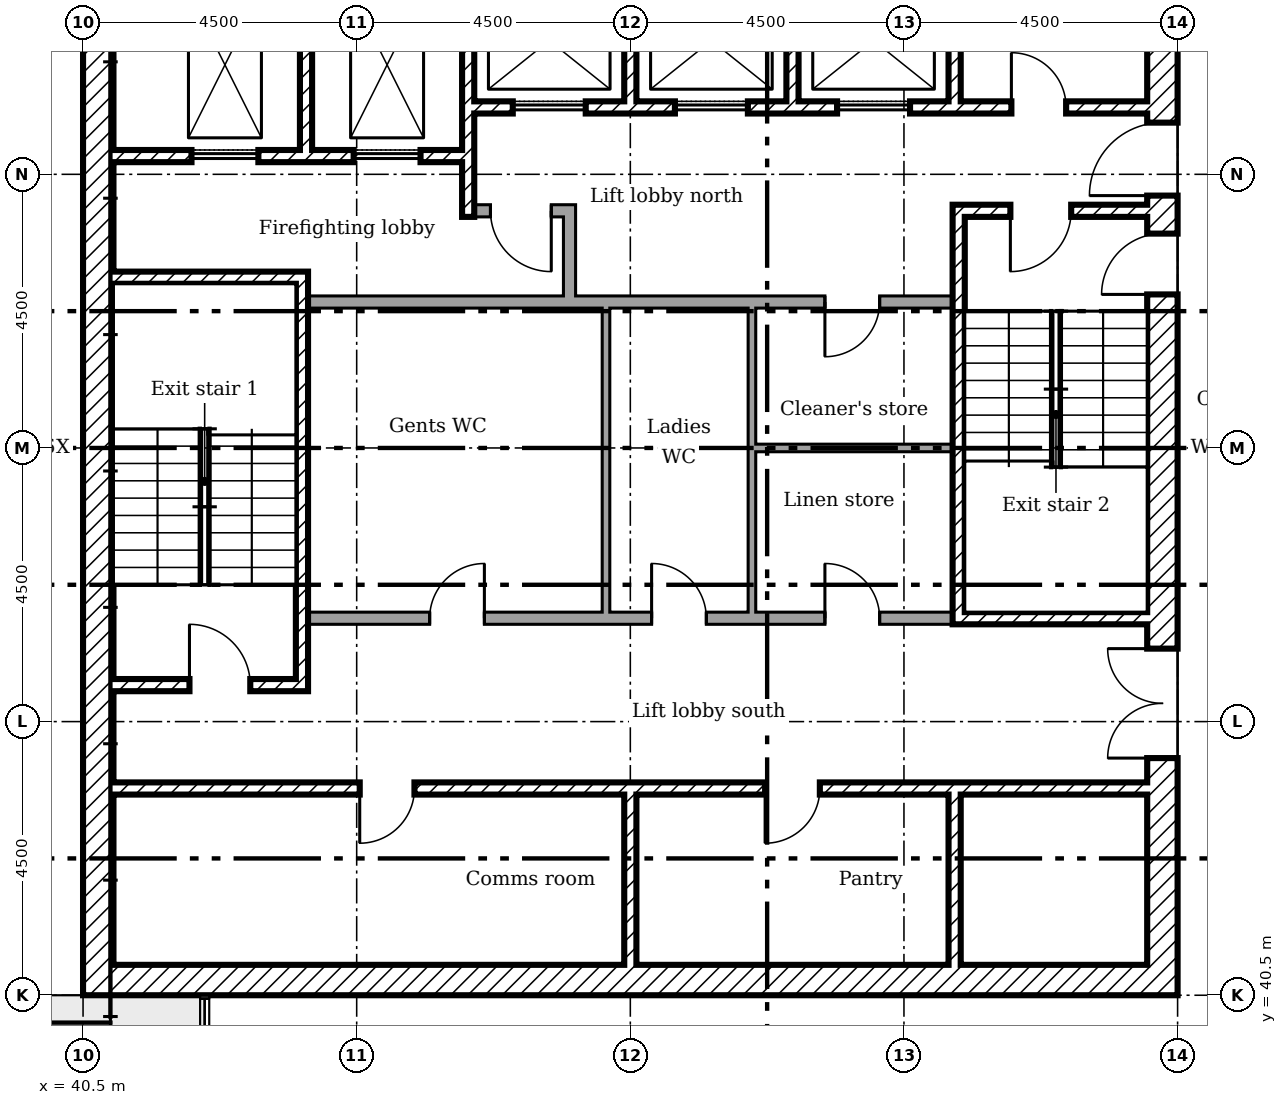
"""IFC4 building model, lengths in metres.
Left out: names, types, materials, properties, quantities, classifications, styles, units other than length and angle.
Written with IfcOpenShell. Run it as: python <this file> out.ifc"""

import sys

from ifc_helpers import new_model, si_unit, direction, frame, frame_2d, origin, place, context, subcontext, project, spatial, rectangle, extrude, element, fill, save


model = new_model("IFC4")
c1 = context("Model", 3, precision=1e-05, world=origin(), true_north=direction((0.0, 1.0)))
c2 = subcontext(c1, "Body", "Model", "MODEL_VIEW")
j1 = project(units=[si_unit("LENGTHUNIT", "METRE"), si_unit("PLANEANGLEUNIT", "RADIAN")], contexts=[c1])
p1 = place(None, origin())
s1 = spatial("IfcSite", under=j1, at=p1, CompositionType="ELEMENT")
p2 = place(p1, origin())
s2 = spatial("IfcBuilding", under=s1, at=p2, CompositionType="ELEMENT")
p3 = place(p2, frame((0.0, 0.0, 195.6)))
s3 = spatial("IfcBuildingStorey", under=s2, at=p3, CompositionType="ELEMENT", Elevation=195.6)
p4 = place(p3, frame((58.25, 40.5, 0.0), z_axis=(0.0, 0.0, 1.0), x_axis=(0.0, 1.0, 0.0)))
e1 = element("IfcWall", 1, at=p4, inside=s3, PredefinedType="SHEAR", context=c2, shape_type="SweptSolid", body=[
    extrude(rectangle(XDim=18.0, YDim=0.5, at=frame_2d((9.0, 0.0))), origin(), (0.0, 0.0, 1.0), 3.35),
])
p5 = place(p4, frame((13.15, 0.0, 0.0)))
e2 = element("IfcOpeningElement", 2, at=p5, cuts=e1, PredefinedType="OPENING", context=c2, shape_type="SweptSolid", body=[
    extrude(rectangle(XDim=1.2, YDim=2.1, at=frame_2d((0.6, 1.05))), frame((0.0, 0.26, 0.0), z_axis=(0.0, -1.0, 0.0), x_axis=(1.0, 0.0, 0.0)), (0.0, 0.0, 1.0), 0.52),
])
p6 = place(p4, frame((3.9, 0.0, 0.0)))
e3 = element("IfcOpeningElement", 3, at=p6, cuts=e1, PredefinedType="OPENING", context=c2, shape_type="SweptSolid", body=[
    extrude(rectangle(XDim=1.8, YDim=2.1, at=frame_2d((0.9, 1.05))), frame((0.0, 0.26, 0.0), z_axis=(0.0, -1.0, 0.0), x_axis=(1.0, 0.0, 0.0)), (0.0, 0.0, 1.0), 0.52),
])
p7 = place(p4, frame((11.525, 0.0, 0.0)))
e4 = element("IfcOpeningElement", 4, at=p7, cuts=e1, PredefinedType="OPENING", context=c2, shape_type="SweptSolid", body=[
    extrude(rectangle(XDim=1.0, YDim=2.1, at=frame_2d((0.5, 1.05))), frame((0.0, 0.26, 0.0), z_axis=(0.0, -1.0, 0.0), x_axis=(1.0, 0.0, 0.0)), (0.0, 0.0, 1.0), 0.52),
])
p8 = place(p3, frame((40.5, 40.75, 0.0)))
e5 = element("IfcWall", 5, at=p8, inside=s3, PredefinedType="SHEAR", context=c2, shape_type="SweptSolid", body=[
    extrude(rectangle(XDim=17.5, YDim=0.5, at=frame_2d((8.75, 0.0))), origin(), (0.0, 0.0, 1.0), 3.35),
])
p9 = place(p3, frame((40.75, 41.0, 0.0), z_axis=(0.0, 0.0, 1.0), x_axis=(0.0, 1.0, 0.0)))
e6 = element("IfcWall", 6, at=p9, inside=s3, PredefinedType="SHEAR", context=c2, shape_type="SweptSolid", body=[
    extrude(rectangle(XDim=17.0, YDim=0.5, at=frame_2d((8.5, 0.0))), origin(), (0.0, 0.0, 1.0), 3.35),
])
p10 = place(p3, frame((44.167, 58.0, 0.0), z_axis=(0.0, 0.0, 1.0), x_axis=(0.0, -1.0, 0.0)))
e7 = element("IfcWall", 7, at=p10, inside=s3, PredefinedType="SHEAR", context=c2, shape_type="SweptSolid", body=[
    extrude(rectangle(XDim=3.6, YDim=0.2, at=frame_2d((1.8, 0.0))), origin(), (0.0, 0.0, 1.0), 3.35),
])
p11 = place(p3, frame((46.833, 58.0, 0.0), z_axis=(0.0, 0.0, 1.0), x_axis=(0.0, -1.0, 0.0)))
e8 = element("IfcWall", 8, at=p11, inside=s3, PredefinedType="SHEAR", context=c2, shape_type="SweptSolid", body=[
    extrude(rectangle(XDim=4.7, YDim=0.2, at=frame_2d((2.35, 0.0))), origin(), (0.0, 0.0, 1.0), 3.35),
])
for number, where, z_axis, x_axis in (
    (9, (49.5, 58.0, 0.0), (0.0, 0.0, 1.0), (0.0, -1.0, 0.0)),
    (10, (52.167, 58.0, 0.0), (0.0, 0.0, 1.0), (0.0, -1.0, 0.0)),
    (11, (54.833, 58.0, 0.0), (0.0, 0.0, 1.0), (0.0, -1.0, 0.0)),
    (12, (49.5, 41.0, 0.0), (0.0, 0.0, 1.0), (0.0, 1.0, 0.0)),
    (13, (54.833, 41.0, 0.0), (0.0, 0.0, 1.0), (0.0, 1.0, 0.0)),
):
    element("IfcWall", number, at=place(p3, frame(where, z_axis=z_axis, x_axis=x_axis)), inside=s3, PredefinedType="SHEAR", context=c2, shape_type="SweptSolid", body=[
        extrude(rectangle(XDim=2.8, YDim=0.2, at=frame_2d((1.4, 0.0))), origin(), (0.0, 0.0, 1.0), 3.35),
    ])
p12 = place(p3, frame((48.5, 51.9, 0.0), z_axis=(0.0, 0.0, 1.0), x_axis=(0.0, 1.0, 0.0)))
e14 = element("IfcWall", 14, at=p12, inside=s3, PredefinedType="PARTITIONING", context=c2, shape_type="SweptSolid", body=[
    extrude(rectangle(XDim=1.6, YDim=0.2, at=frame_2d((0.8, 0.0))), origin(), (0.0, 0.0, 1.0), 3.35),
])
p13 = place(p3, frame((46.933, 53.4, 0.0)))
e15 = element("IfcWall", 15, at=p13, inside=s3, PredefinedType="PARTITIONING", context=c2, shape_type="SweptSolid", body=[
    extrude(rectangle(XDim=1.467, YDim=0.2, at=frame_2d((0.733, 0.0))), origin(), (0.0, 0.0, 1.0), 3.35),
])
p14 = place(p13, frame((0.267, 0.0, 0.0)))
e16 = element("IfcOpeningElement", 16, at=p14, cuts=e15, PredefinedType="OPENING", context=c2, shape_type="SweptSolid", body=[
    extrude(rectangle(XDim=1.0, YDim=2.1, at=frame_2d((0.5, 1.05))), frame((0.0, 0.11, 0.0), z_axis=(0.0, -1.0, 0.0), x_axis=(1.0, 0.0, 0.0)), (0.0, 0.0, 1.0), 0.22),
])
p15 = place(p3, frame((46.933, 55.1, 0.0)))
e17 = element("IfcWall", 17, at=p15, inside=s3, PredefinedType="SHEAR", context=c2, shape_type="SweptSolid", body=[
    extrude(rectangle(XDim=11.067, YDim=0.2, at=frame_2d((5.533, 0.0))), origin(), (0.0, 0.0, 1.0), 3.35),
])
p16 = place(p15, frame((8.833, 0.0, 0.0)))
e18 = element("IfcOpeningElement", 18, at=p16, cuts=e17, PredefinedType="OPENING", context=c2, shape_type="SweptSolid", body=[
    extrude(rectangle(XDim=0.9, YDim=2.1, at=frame_2d((0.45, 1.05))), frame((0.0, 0.11, 0.0), z_axis=(0.0, -1.0, 0.0), x_axis=(1.0, 0.0, 0.0)), (0.0, 0.0, 1.0), 0.22),
])
p17 = place(p15, frame((0.633, 0.0, 0.0)))
e19 = element("IfcOpeningElement", 19, at=p17, cuts=e17, PredefinedType="OPENING", context=c2, shape_type="SweptSolid", body=[
    extrude(rectangle(XDim=1.2, YDim=2.1, at=frame_2d((0.6, 1.05))), frame((0.0, 0.11, 0.0), z_axis=(0.0, -1.0, 0.0), x_axis=(1.0, 0.0, 0.0)), (0.0, 0.0, 1.0), 0.22),
])
p18 = place(p15, frame((3.3, 0.0, 0.0)))
e20 = element("IfcOpeningElement", 20, at=p18, cuts=e17, PredefinedType="OPENING", context=c2, shape_type="SweptSolid", body=[
    extrude(rectangle(XDim=1.2, YDim=2.1, at=frame_2d((0.6, 1.05))), frame((0.0, 0.11, 0.0), z_axis=(0.0, -1.0, 0.0), x_axis=(1.0, 0.0, 0.0)), (0.0, 0.0, 1.0), 0.22),
])
p19 = place(p15, frame((5.967, 0.0, 0.0)))
e21 = element("IfcOpeningElement", 21, at=p19, cuts=e17, PredefinedType="OPENING", context=c2, shape_type="SweptSolid", body=[
    extrude(rectangle(XDim=1.2, YDim=2.1, at=frame_2d((0.6, 1.05))), frame((0.0, 0.11, 0.0), z_axis=(0.0, -1.0, 0.0), x_axis=(1.0, 0.0, 0.0)), (0.0, 0.0, 1.0), 0.22),
])
p20 = place(p3, frame((41.0, 54.3, 0.0)))
e22 = element("IfcWall", 22, at=p20, inside=s3, PredefinedType="SHEAR", context=c2, shape_type="SweptSolid", body=[
    extrude(rectangle(XDim=5.733, YDim=0.2, at=frame_2d((2.867, 0.0))), origin(), (0.0, 0.0, 1.0), 3.35),
])
p21 = place(p20, frame((1.283, 0.0, 0.0)))
e23 = element("IfcOpeningElement", 23, at=p21, cuts=e22, PredefinedType="OPENING", context=c2, shape_type="SweptSolid", body=[
    extrude(rectangle(XDim=1.1, YDim=2.1, at=frame_2d((0.55, 1.05))), frame((0.0, 0.11, 0.0), z_axis=(0.0, -1.0, 0.0), x_axis=(1.0, 0.0, 0.0)), (0.0, 0.0, 1.0), 0.22),
])
p22 = place(p20, frame((3.95, 0.0, 0.0)))
e24 = element("IfcOpeningElement", 24, at=p22, cuts=e22, PredefinedType="OPENING", context=c2, shape_type="SweptSolid", body=[
    extrude(rectangle(XDim=1.1, YDim=2.1, at=frame_2d((0.55, 1.05))), frame((0.0, 0.11, 0.0), z_axis=(0.0, -1.0, 0.0), x_axis=(1.0, 0.0, 0.0)), (0.0, 0.0, 1.0), 0.22),
])
p23 = place(p3, frame((41.0, 43.9, 0.0)))
e25 = element("IfcWall", 25, at=p23, inside=s3, PredefinedType="SHEAR", context=c2, shape_type="SweptSolid", body=[
    extrude(rectangle(XDim=17.0, YDim=0.2, at=frame_2d((8.5, 0.0))), origin(), (0.0, 0.0, 1.0), 3.35),
])
p24 = place(p23, frame((4.05, 0.0, 0.0)))
e26 = element("IfcOpeningElement", 26, at=p24, cuts=e25, PredefinedType="OPENING", context=c2, shape_type="SweptSolid", body=[
    extrude(rectangle(XDim=0.9, YDim=2.1, at=frame_2d((0.45, 1.05))), frame((0.0, 0.11, 0.0), z_axis=(0.0, -1.0, 0.0), x_axis=(1.0, 0.0, 0.0)), (0.0, 0.0, 1.0), 0.22),
])
p25 = place(p23, frame((10.717, 0.0, 0.0)))
e27 = element("IfcOpeningElement", 27, at=p25, cuts=e25, PredefinedType="OPENING", context=c2, shape_type="SweptSolid", body=[
    extrude(rectangle(XDim=0.9, YDim=2.1, at=frame_2d((0.45, 1.05))), frame((0.0, 0.11, 0.0), z_axis=(0.0, -1.0, 0.0), x_axis=(1.0, 0.0, 0.0)), (0.0, 0.0, 1.0), 0.22),
])
p26 = place(p3, frame((44.1, 45.5, 0.0), z_axis=(0.0, 0.0, 1.0), x_axis=(0.0, 1.0, 0.0)))
e28 = element("IfcWall", 28, at=p26, inside=s3, PredefinedType="SHEAR", context=c2, shape_type="SweptSolid", body=[
    extrude(rectangle(XDim=6.9, YDim=0.2, at=frame_2d((3.45, 0.0))), origin(), (0.0, 0.0, 1.0), 3.35),
])
p27 = place(p3, frame((41.0, 52.3, 0.0)))
e29 = element("IfcWall", 29, at=p27, inside=s3, PredefinedType="SHEAR", context=c2, shape_type="SweptSolid", body=[
    extrude(rectangle(XDim=3.0, YDim=0.2, at=frame_2d((1.5, 0.0))), origin(), (0.0, 0.0, 1.0), 3.35),
])
p28 = place(p3, frame((41.0, 45.6, 0.0)))
e30 = element("IfcWall", 30, at=p28, inside=s3, PredefinedType="SHEAR", context=c2, shape_type="SweptSolid", body=[
    extrude(rectangle(XDim=3.0, YDim=0.2, at=frame_2d((1.5, 0.0))), origin(), (0.0, 0.0, 1.0), 3.35),
])
p29 = place(p28, frame((1.25, 0.0, 0.0)))
e31 = element("IfcOpeningElement", 31, at=p29, cuts=e30, PredefinedType="OPENING", context=c2, shape_type="SweptSolid", body=[
    extrude(rectangle(XDim=1.0, YDim=2.1, at=frame_2d((0.5, 1.05))), frame((0.0, 0.11, 0.0), z_axis=(0.0, -1.0, 0.0), x_axis=(1.0, 0.0, 0.0)), (0.0, 0.0, 1.0), 0.22),
])
p30 = place(p3, frame((54.8, 53.4, 0.0)))
e32 = element("IfcWall", 32, at=p30, inside=s3, PredefinedType="SHEAR", context=c2, shape_type="SweptSolid", body=[
    extrude(rectangle(XDim=3.2, YDim=0.2, at=frame_2d((1.6, 0.0))), origin(), (0.0, 0.0, 1.0), 3.35),
])
p31 = place(p30, frame((0.95, 0.0, 0.0)))
e33 = element("IfcOpeningElement", 33, at=p31, cuts=e32, PredefinedType="OPENING", context=c2, shape_type="SweptSolid", body=[
    extrude(rectangle(XDim=1.0, YDim=2.1, at=frame_2d((0.5, 1.05))), frame((0.0, 0.11, 0.0), z_axis=(0.0, -1.0, 0.0), x_axis=(1.0, 0.0, 0.0)), (0.0, 0.0, 1.0), 0.22),
])
p32 = place(p3, frame((54.8, 46.7, 0.0)))
e34 = element("IfcWall", 34, at=p32, inside=s3, PredefinedType="SHEAR", context=c2, shape_type="SweptSolid", body=[
    extrude(rectangle(XDim=3.2, YDim=0.2, at=frame_2d((1.6, 0.0))), origin(), (0.0, 0.0, 1.0), 3.35),
])
p33 = place(p3, frame((54.9, 46.8, 0.0), z_axis=(0.0, 0.0, 1.0), x_axis=(0.0, 1.0, 0.0)))
e35 = element("IfcWall", 35, at=p33, inside=s3, PredefinedType="SHEAR", context=c2, shape_type="SweptSolid", body=[
    extrude(rectangle(XDim=6.5, YDim=0.2, at=frame_2d((3.25, 0.0))), origin(), (0.0, 0.0, 1.0), 3.35),
])
p34 = place(p3, frame((44.2, 51.9, 0.0)))
e36 = element("IfcWall", 36, at=p34, inside=s3, PredefinedType="PARTITIONING", context=c2, shape_type="SweptSolid", body=[
    extrude(rectangle(XDim=10.6, YDim=0.2, at=frame_2d((5.3, 0.0))), origin(), (0.0, 0.0, 1.0), 3.35),
])
p35 = place(p34, frame((8.5, 0.0, 0.0)))
e37 = element("IfcOpeningElement", 37, at=p35, cuts=e36, PredefinedType="OPENING", context=c2, shape_type="SweptSolid", body=[
    extrude(rectangle(XDim=0.9, YDim=2.1, at=frame_2d((0.45, 1.05))), frame((0.0, 0.11, 0.0), z_axis=(0.0, -1.0, 0.0), x_axis=(1.0, 0.0, 0.0)), (0.0, 0.0, 1.0), 0.22),
])
p36 = place(p3, frame((44.2, 46.7, 0.0)))
e38 = element("IfcWall", 38, at=p36, inside=s3, PredefinedType="PARTITIONING", context=c2, shape_type="SweptSolid", body=[
    extrude(rectangle(XDim=10.6, YDim=0.2, at=frame_2d((5.3, 0.0))), origin(), (0.0, 0.0, 1.0), 3.35),
])
p37 = place(p36, frame((2.0, 0.0, 0.0)))
e39 = element("IfcOpeningElement", 39, at=p37, cuts=e38, PredefinedType="OPENING", context=c2, shape_type="SweptSolid", body=[
    extrude(rectangle(XDim=0.9, YDim=2.1, at=frame_2d((0.45, 1.05))), frame((0.0, 0.11, 0.0), z_axis=(0.0, -1.0, 0.0), x_axis=(1.0, 0.0, 0.0)), (0.0, 0.0, 1.0), 0.22),
])
p38 = place(p36, frame((5.65, 0.0, 0.0)))
e40 = element("IfcOpeningElement", 40, at=p38, cuts=e38, PredefinedType="OPENING", context=c2, shape_type="SweptSolid", body=[
    extrude(rectangle(XDim=0.9, YDim=2.1, at=frame_2d((0.45, 1.05))), frame((0.0, 0.11, 0.0), z_axis=(0.0, -1.0, 0.0), x_axis=(1.0, 0.0, 0.0)), (0.0, 0.0, 1.0), 0.22),
])
p39 = place(p36, frame((8.5, 0.0, 0.0)))
e41 = element("IfcOpeningElement", 41, at=p39, cuts=e38, PredefinedType="OPENING", context=c2, shape_type="SweptSolid", body=[
    extrude(rectangle(XDim=0.9, YDim=2.1, at=frame_2d((0.45, 1.05))), frame((0.0, 0.11, 0.0), z_axis=(0.0, -1.0, 0.0), x_axis=(1.0, 0.0, 0.0)), (0.0, 0.0, 1.0), 0.22),
])
p40 = place(p3, frame((49.1, 46.8, 0.0), z_axis=(0.0, 0.0, 1.0), x_axis=(0.0, 1.0, 0.0)))
e42 = element("IfcWall", 42, at=p40, inside=s3, PredefinedType="PARTITIONING", context=c2, shape_type="SweptSolid", body=[
    extrude(rectangle(XDim=5.0, YDim=0.125, at=frame_2d((2.5, 0.0))), origin(), (0.0, 0.0, 1.0), 3.35),
])
p41 = place(p3, frame((51.5, 46.8, 0.0), z_axis=(0.0, 0.0, 1.0), x_axis=(0.0, 1.0, 0.0)))
e43 = element("IfcWall", 43, at=p41, inside=s3, PredefinedType="PARTITIONING", context=c2, shape_type="SweptSolid", body=[
    extrude(rectangle(XDim=2.762, YDim=0.125, at=frame_2d((1.381, 0.0))), origin(), (0.0, 0.0, 1.0), 3.35),
])
p42 = place(p3, frame((51.562, 49.5, 0.0)))
e44 = element("IfcWall", 44, at=p42, inside=s3, PredefinedType="PARTITIONING", context=c2, shape_type="SweptSolid", body=[
    extrude(rectangle(XDim=3.238, YDim=0.125, at=frame_2d((1.619, 0.0))), origin(), (0.0, 0.0, 1.0), 3.35),
])
p43 = place(p3, frame((51.5, 49.5, 0.0), z_axis=(0.0, 0.0, 1.0), x_axis=(0.0, 1.0, 0.0)))
e45 = element("IfcWall", 45, at=p43, inside=s3, PredefinedType="PARTITIONING", context=c2, shape_type="SweptSolid", body=[
    extrude(rectangle(XDim=2.3, YDim=0.125, at=frame_2d((1.15, 0.0))), origin(), (0.0, 0.0, 1.0), 3.35),
])
p44 = place(p5, origin())
e46 = element("IfcDoor", 46, at=p44, inside=s3, OperationType="SINGLE_SWING_RIGHT", PredefinedType="DOOR", context=c2, shape_type="SweptSolid", body=[
    extrude(rectangle(XDim=1.2, YDim=2.1, at=frame_2d((0.6, 1.05))), frame((0.0, 0.025, 0.0), z_axis=(0.0, -1.0, 0.0), x_axis=(1.0, 0.0, 0.0)), (0.0, 0.0, 1.0), 0.05),
])
fill(e2, e46)
p45 = place(p6, origin())
e47 = element("IfcDoor", 47, at=p45, inside=s3, OperationType="DOUBLE_DOOR_SINGLE_SWING", PredefinedType="DOOR", context=c2, shape_type="SweptSolid", body=[
    extrude(rectangle(XDim=1.8, YDim=2.1, at=frame_2d((0.9, 1.05))), frame((0.0, 0.025, 0.0), z_axis=(0.0, -1.0, 0.0), x_axis=(1.0, 0.0, 0.0)), (0.0, 0.0, 1.0), 0.05),
])
fill(e3, e47)
p46 = place(p29, origin())
e48 = element("IfcDoor", 48, at=p46, inside=s3, OperationType="SINGLE_SWING_RIGHT", PredefinedType="DOOR", context=c2, shape_type="SweptSolid", body=[
    extrude(rectangle(XDim=1.0, YDim=2.1, at=frame_2d((0.5, 1.05))), frame((0.0, 0.025, 0.0), z_axis=(0.0, -1.0, 0.0), x_axis=(1.0, 0.0, 0.0)), (0.0, 0.0, 1.0), 0.05),
])
fill(e31, e48)
p47 = place(p31, frame((1.0, 0.0, 0.0), x_axis=(-1.0, 0.0, 0.0)))
e49 = element("IfcDoor", 49, at=p47, inside=s3, OperationType="SINGLE_SWING_LEFT", PredefinedType="DOOR", context=c2, shape_type="SweptSolid", body=[
    extrude(rectangle(XDim=1.0, YDim=2.1, at=frame_2d((0.5, 1.05))), frame((0.0, 0.025, 0.0), z_axis=(0.0, -1.0, 0.0), x_axis=(1.0, 0.0, 0.0)), (0.0, 0.0, 1.0), 0.05),
])
fill(e33, e49)
p48 = place(p7, origin())
e50 = element("IfcDoor", 50, at=p48, inside=s3, OperationType="SINGLE_SWING_RIGHT", PredefinedType="DOOR", context=c2, shape_type="SweptSolid", body=[
    extrude(rectangle(XDim=1.0, YDim=2.1, at=frame_2d((0.5, 1.05))), frame((0.0, 0.025, 0.0), z_axis=(0.0, -1.0, 0.0), x_axis=(1.0, 0.0, 0.0)), (0.0, 0.0, 1.0), 0.05),
])
fill(e4, e50)
p49 = place(p14, frame((1.0, 0.0, 0.0), x_axis=(-1.0, 0.0, 0.0)))
e51 = element("IfcDoor", 51, at=p49, inside=s3, OperationType="SINGLE_SWING_RIGHT", PredefinedType="DOOR", context=c2, shape_type="SweptSolid", body=[
    extrude(rectangle(XDim=1.0, YDim=2.1, at=frame_2d((0.5, 1.05))), frame((0.0, 0.025, 0.0), z_axis=(0.0, -1.0, 0.0), x_axis=(1.0, 0.0, 0.0)), (0.0, 0.0, 1.0), 0.05),
])
fill(e16, e51)
p50 = place(p16, origin())
e52 = element("IfcDoor", 52, at=p50, inside=s3, OperationType="SINGLE_SWING_RIGHT", PredefinedType="DOOR", context=c2, shape_type="SweptSolid", body=[
    extrude(rectangle(XDim=0.9, YDim=2.1, at=frame_2d((0.45, 1.05))), frame((0.0, 0.025, 0.0), z_axis=(0.0, -1.0, 0.0), x_axis=(1.0, 0.0, 0.0)), (0.0, 0.0, 1.0), 0.05),
])
fill(e18, e52)
p51 = place(p24, frame((0.9, 0.0, 0.0), x_axis=(-1.0, 0.0, 0.0)))
e53 = element("IfcDoor", 53, at=p51, inside=s3, OperationType="SINGLE_SWING_LEFT", PredefinedType="DOOR", context=c2, shape_type="SweptSolid", body=[
    extrude(rectangle(XDim=0.9, YDim=2.1, at=frame_2d((0.45, 1.05))), frame((0.0, 0.025, 0.0), z_axis=(0.0, -1.0, 0.0), x_axis=(1.0, 0.0, 0.0)), (0.0, 0.0, 1.0), 0.05),
])
fill(e26, e53)
p52 = place(p25, frame((0.9, 0.0, 0.0), x_axis=(-1.0, 0.0, 0.0)))
e54 = element("IfcDoor", 54, at=p52, inside=s3, OperationType="SINGLE_SWING_LEFT", PredefinedType="DOOR", context=c2, shape_type="SweptSolid", body=[
    extrude(rectangle(XDim=0.9, YDim=2.1, at=frame_2d((0.45, 1.05))), frame((0.0, 0.025, 0.0), z_axis=(0.0, -1.0, 0.0), x_axis=(1.0, 0.0, 0.0)), (0.0, 0.0, 1.0), 0.05),
])
fill(e27, e54)
p53 = place(p37, origin())
e55 = element("IfcDoor", 55, at=p53, inside=s3, OperationType="SINGLE_SWING_LEFT", PredefinedType="DOOR", context=c2, shape_type="SweptSolid", body=[
    extrude(rectangle(XDim=0.9, YDim=2.1, at=frame_2d((0.45, 1.05))), frame((0.0, 0.025, 0.0), z_axis=(0.0, -1.0, 0.0), x_axis=(1.0, 0.0, 0.0)), (0.0, 0.0, 1.0), 0.05),
])
fill(e39, e55)
p54 = place(p38, origin())
e56 = element("IfcDoor", 56, at=p54, inside=s3, OperationType="SINGLE_SWING_RIGHT", PredefinedType="DOOR", context=c2, shape_type="SweptSolid", body=[
    extrude(rectangle(XDim=0.9, YDim=2.1, at=frame_2d((0.45, 1.05))), frame((0.0, 0.025, 0.0), z_axis=(0.0, -1.0, 0.0), x_axis=(1.0, 0.0, 0.0)), (0.0, 0.0, 1.0), 0.05),
])
fill(e40, e56)
p55 = place(p35, frame((0.9, 0.0, 0.0), x_axis=(-1.0, 0.0, 0.0)))
e57 = element("IfcDoor", 57, at=p55, inside=s3, OperationType="SINGLE_SWING_LEFT", PredefinedType="DOOR", context=c2, shape_type="SweptSolid", body=[
    extrude(rectangle(XDim=0.9, YDim=2.1, at=frame_2d((0.45, 1.05))), frame((0.0, 0.025, 0.0), z_axis=(0.0, -1.0, 0.0), x_axis=(1.0, 0.0, 0.0)), (0.0, 0.0, 1.0), 0.05),
])
fill(e37, e57)
p56 = place(p39, origin())
e58 = element("IfcDoor", 58, at=p56, inside=s3, OperationType="SINGLE_SWING_RIGHT", PredefinedType="DOOR", context=c2, shape_type="SweptSolid", body=[
    extrude(rectangle(XDim=0.9, YDim=2.1, at=frame_2d((0.45, 1.05))), frame((0.0, 0.025, 0.0), z_axis=(0.0, -1.0, 0.0), x_axis=(1.0, 0.0, 0.0)), (0.0, 0.0, 1.0), 0.05),
])
fill(e41, e58)
p57 = place(p21, origin())
e59 = element("IfcDoor", 59, at=p57, inside=s3, OperationType="SLIDING_TO_LEFT", PredefinedType="DOOR", context=c2, shape_type="SweptSolid", body=[
    extrude(rectangle(XDim=1.1, YDim=2.1, at=frame_2d((0.55, 1.05))), frame((0.0, 0.025, 0.0), z_axis=(0.0, -1.0, 0.0), x_axis=(1.0, 0.0, 0.0)), (0.0, 0.0, 1.0), 0.05),
])
fill(e23, e59)
p58 = place(p22, origin())
e60 = element("IfcDoor", 60, at=p58, inside=s3, OperationType="SLIDING_TO_LEFT", PredefinedType="DOOR", context=c2, shape_type="SweptSolid", body=[
    extrude(rectangle(XDim=1.1, YDim=2.1, at=frame_2d((0.55, 1.05))), frame((0.0, 0.025, 0.0), z_axis=(0.0, -1.0, 0.0), x_axis=(1.0, 0.0, 0.0)), (0.0, 0.0, 1.0), 0.05),
])
fill(e24, e60)
p59 = place(p17, origin())
e61 = element("IfcDoor", 61, at=p59, inside=s3, OperationType="SLIDING_TO_LEFT", PredefinedType="DOOR", context=c2, shape_type="SweptSolid", body=[
    extrude(rectangle(XDim=1.2, YDim=2.1, at=frame_2d((0.6, 1.05))), frame((0.0, 0.025, 0.0), z_axis=(0.0, -1.0, 0.0), x_axis=(1.0, 0.0, 0.0)), (0.0, 0.0, 1.0), 0.05),
])
fill(e19, e61)
p60 = place(p18, origin())
e62 = element("IfcDoor", 62, at=p60, inside=s3, OperationType="SLIDING_TO_LEFT", PredefinedType="DOOR", context=c2, shape_type="SweptSolid", body=[
    extrude(rectangle(XDim=1.2, YDim=2.1, at=frame_2d((0.6, 1.05))), frame((0.0, 0.025, 0.0), z_axis=(0.0, -1.0, 0.0), x_axis=(1.0, 0.0, 0.0)), (0.0, 0.0, 1.0), 0.05),
])
fill(e20, e62)
p61 = place(p19, origin())
e63 = element("IfcDoor", 63, at=p61, inside=s3, OperationType="SLIDING_TO_LEFT", PredefinedType="DOOR", context=c2, shape_type="SweptSolid", body=[
    extrude(rectangle(XDim=1.2, YDim=2.1, at=frame_2d((0.6, 1.05))), frame((0.0, 0.025, 0.0), z_axis=(0.0, -1.0, 0.0), x_axis=(1.0, 0.0, 0.0)), (0.0, 0.0, 1.0), 0.05),
])
fill(e21, e63)
save(model, sys.argv[1])
